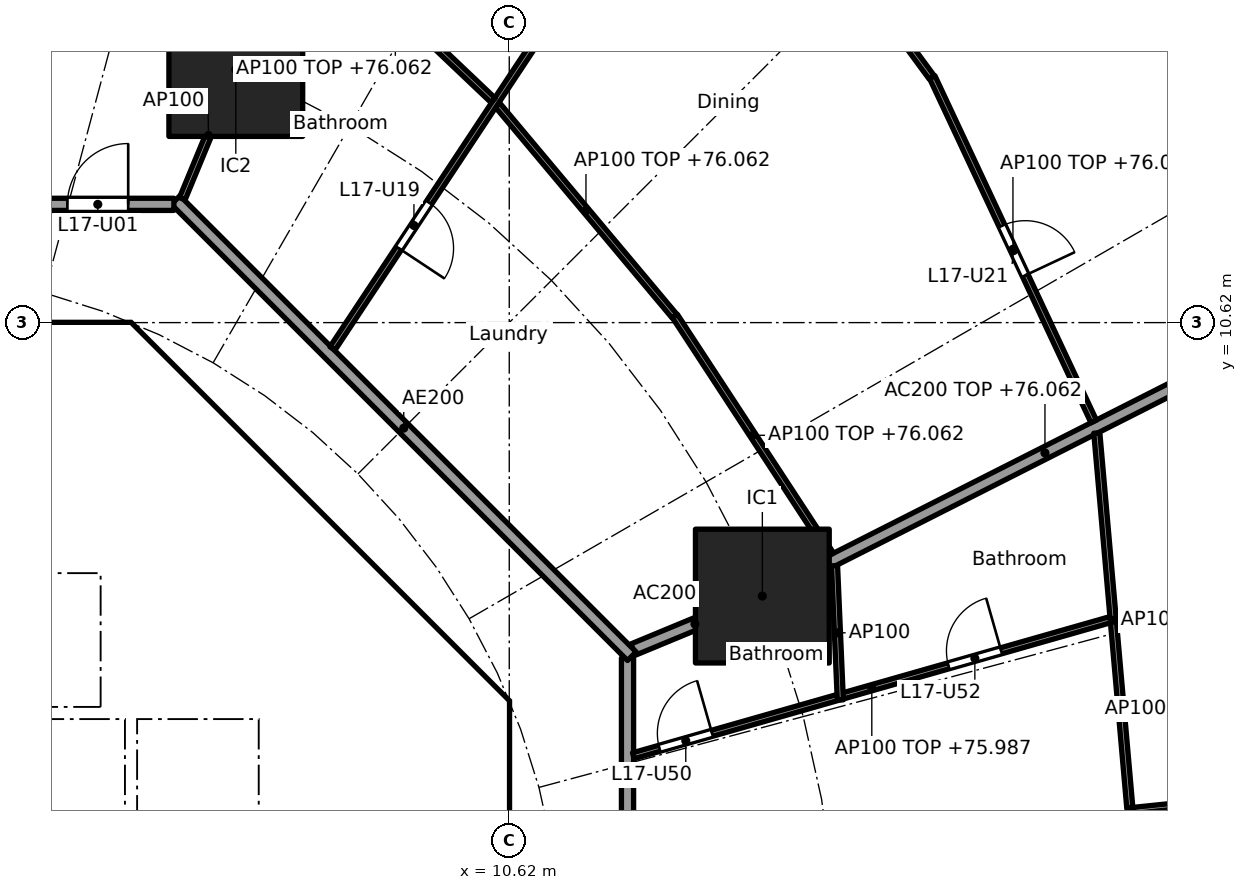
"""IFC4 building model, lengths in metres.
Left out: names, types, materials, properties, quantities, classifications, styles, units other than length and angle.
Written with IfcOpenShell. Run it as: python <this file> out.ifc"""

import sys

from ifc_helpers import new_model, si_unit, direction, frame, frame_2d, origin, origin_2d, place, context, subcontext, project, spatial, polyline, rectangle, outline, extrude, element, fill, save


model = new_model("IFC4")
c1 = context("Model", 3, precision=1e-05, world=origin(), true_north=direction((0.0, 1.0)))
c2 = subcontext(c1, "Body", "Model", "MODEL_VIEW")
j1 = project(units=[si_unit("LENGTHUNIT", "METRE"), si_unit("PLANEANGLEUNIT", "RADIAN")], contexts=[c1])
p1 = place(None, origin())
s1 = spatial("IfcSite", under=j1, at=p1, CompositionType="ELEMENT")
p2 = place(p1, origin())
s2 = spatial("IfcBuilding", under=s1, at=p2, CompositionType="ELEMENT")
p3 = place(p2, frame((0.0, 0.0, 73.3)))
s3 = spatial("IfcBuildingStorey", under=s2, at=p3, CompositionType="ELEMENT", Elevation=73.3)
for number, where, z_axis, x_axis in (
    (1, (14.782, 6.123, 0.0), (0.0, 0.0, 1.0), (1.0, 0.0, 0.0)),
    (2, (6.123, 14.782, 0.0), (0.0, 0.0, 1.0), (1.0, 0.0, 0.0)),
):
    element("IfcColumn", number, at=place(p3, frame(where, z_axis=z_axis, x_axis=x_axis)), inside=s3, PredefinedType="COLUMN", context=c2, shape_type="SweptSolid", body=[
        extrude(rectangle(XDim=2.2, YDim=2.2, at=origin_2d()), origin(), (0.0, 0.0, 1.0), 3.7),
    ])
p4 = place(p3, frame((9.988, 4.613, 0.0), z_axis=(0.0, 0.0, 1.0), x_axis=(-0.707106781187, 0.707106781187, 0.0)))
e3 = element("IfcWall", 3, at=p4, inside=s3, PredefinedType="SHEAR", context=c2, shape_type="SweptSolid", body=[
    extrude(rectangle(XDim=7.602, YDim=0.6, at=frame_2d((3.801, 0.0))), origin(), (0.0, 0.0, 1.0), 3.44),
])
p5 = place(p4, frame((3.201, 0.0, 0.0)))
e4 = element("IfcOpeningElement", 4, at=p5, cuts=e3, PredefinedType="OPENING", context=c2, shape_type="SweptSolid", body=[
    extrude(rectangle(XDim=1.2, YDim=2.1, at=frame_2d((0.6, 1.05))), frame((0.0, 0.31, 0.0), z_axis=(0.0, -1.0, 0.0), x_axis=(1.0, 0.0, 0.0)), (0.0, 0.0, 1.0), 0.62),
])
p6 = place(p3, frame((4.0, 4.3, 0.0), z_axis=(0.0, 0.0, 1.0), x_axis=(0.0, 1.0, 0.0)))
e5 = element("IfcWall", 5, at=p6, inside=s3, PredefinedType="SOLIDWALL", context=c2, shape_type="SweptSolid", body=[
    extrude(rectangle(XDim=2.2, YDim=0.2, at=frame_2d((1.1, 0.0))), origin(), (0.0, 0.0, 1.0), 3.44),
])
p7 = place(p6, frame((0.55, 0.0, 0.0)))
e6 = element("IfcOpeningElement", 6, at=p7, cuts=e5, PredefinedType="OPENING", context=c2, shape_type="SweptSolid", body=[
    extrude(rectangle(XDim=1.1, YDim=2.1, at=frame_2d((0.55, 1.05))), frame((0.0, 0.11, 0.0), z_axis=(0.0, -1.0, 0.0), x_axis=(1.0, 0.0, 0.0)), (0.0, 0.0, 1.0), 0.22),
])
p8 = place(p3, frame((6.7, 4.0, 0.0), z_axis=(0.0, 0.0, 1.0), x_axis=(1.0, 0.0, 0.0)))
e7 = element("IfcWall", 7, at=p8, inside=s3, PredefinedType="SOLIDWALL", context=c2, shape_type="SweptSolid", body=[
    extrude(rectangle(XDim=3.325, YDim=0.2, at=frame_2d((1.662, 0.0))), origin(), (0.0, 0.0, 1.0), 3.44),
])
p9 = place(p8, frame((1.25, 0.0, 0.0)))
e8 = element("IfcOpeningElement", 8, at=p9, cuts=e7, PredefinedType="OPENING", context=c2, shape_type="SweptSolid", body=[
    extrude(rectangle(XDim=1.1, YDim=2.1, at=frame_2d((0.55, 1.05))), frame((0.0, 0.11, 0.0), z_axis=(0.0, -1.0, 0.0), x_axis=(1.0, 0.0, 0.0)), (0.0, 0.0, 1.0), 0.22),
])
p10 = place(p3, frame((4.0, 7.025, 0.0), z_axis=(0.0, 0.0, 1.0), x_axis=(0.0, 1.0, 0.0)))
e9 = element("IfcWall", 9, at=p10, inside=s3, PredefinedType="SOLIDWALL", context=c2, shape_type="SweptSolid", body=[
    extrude(rectangle(XDim=3.0, YDim=0.2, at=frame_2d((1.5, 0.0))), origin(), (0.0, 0.0, 1.0), 3.44),
])
p11 = place(p10, frame((0.925, 0.0, 0.0)))
e10 = element("IfcOpeningElement", 10, at=p11, cuts=e9, PredefinedType="OPENING", context=c2, shape_type="SweptSolid", body=[
    extrude(rectangle(XDim=1.1, YDim=2.1, at=frame_2d((0.55, 1.05))), frame((0.0, 0.11, 0.0), z_axis=(0.0, -1.0, 0.0), x_axis=(1.0, 0.0, 0.0)), (0.0, 0.0, 1.0), 0.22),
])
p12 = place(p3, origin())
e11 = element("IfcWall", 11, at=p12, inside=s3, PredefinedType="SHEAR", context=c2, shape_type="SweptSolid", body=[
    extrude(outline(polyline([(-4.152, 10.025), (-4.401, 9.776), (-4.825, 10.2), (-4.401, 10.625), (4.401, 10.625), (4.825, 10.2), (4.401, 9.776), (4.152, 10.025), (-4.152, 10.025)])), origin(), (0.0, 0.0, 1.0), 3.44),
])
p13 = place(p3, origin())
e12 = element("IfcWall", 12, at=p13, inside=s3, PredefinedType="SHEAR", context=c2, shape_type="SweptSolid", body=[
    extrude(outline(polyline([(9.776, -4.401), (10.025, -4.152), (10.025, -3.801), (10.025, 4.152), (9.776, 4.401), (10.2, 4.825), (10.625, 4.401), (10.625, -4.401), (10.2, -4.825), (9.776, -4.401)])), origin(), (0.0, 0.0, 1.0), 3.44),
])
p14 = place(p3, origin())
e13 = element("IfcWall", 13, at=p14, inside=s3, PredefinedType="SOLIDWALL", context=c2, shape_type="SweptSolid", body=[
    extrude(outline(polyline([(-6.5, 2.1), (-6.7, 2.1), (-6.7, 4.3), (6.7, 4.3), (6.7, 2.1), (6.5, 2.1), (6.5, 4.1), (4.5, 4.1), (4.5, 2.1), (4.3, 2.1), (4.3, 4.1), (2.3, 4.1), (2.3, 2.1), (2.1, 2.1), (2.1, 4.1), (0.1, 4.1), (0.1, 2.1), (-0.1, 2.1), (-0.1, 4.1), (-2.1, 4.1), (-2.1, 2.1), (-2.3, 2.1), (-2.3, 4.1), (-4.3, 4.1), (-4.3, 2.1), (-4.5, 2.1), (-4.5, 4.1), (-6.5, 4.1), (-6.5, 2.1)])), origin(), (0.0, 0.0, 1.0), 3.44),
])
p15 = place(p3, origin())
e14 = element("IfcWall", 14, at=p15, inside=s3, PredefinedType="SOLIDWALL", context=c2, shape_type="SweptSolid", body=[
    extrude(outline(polyline([(4.1, 6.5), (-4.1, 6.5), (-4.1, 7.025), (4.1, 7.025), (4.1, 6.5)])), origin(), (0.0, 0.0, 1.0), 3.44),
])
p16 = place(p3, origin())
e15 = element("IfcWall", 15, at=p16, inside=s3, PredefinedType="SOLIDWALL", context=c2, shape_type="SweptSolid", body=[
    extrude(outline(polyline([(7.025, -3.9), (6.7, -3.9), (6.7, 3.9), (7.025, 3.9), (7.025, -3.9)])), origin(), (0.0, 0.0, 1.0), 3.44),
])
p17 = place(p3, frame((12.657, 5.243, 0.0), z_axis=(0.0, 0.0, 1.0), x_axis=(0.923876145736, 0.382691608661, 0.0)))
e16 = element("IfcWall", 16, at=p17, inside=s3, PredefinedType="PARTITIONING", context=c2, shape_type="SweptSolid", body=[
    extrude(rectangle(XDim=2.2, YDim=0.2, at=frame_2d((1.1, 0.0))), origin(), (0.0, 0.0, 1.0), 3.44),
])
p18 = place(p3, frame((14.827, 6.146, 0.0), z_axis=(0.0, 0.0, 1.0), x_axis=(0.892068075337, 0.451901038906, 0.0)))
e17 = element("IfcWall", 17, at=p18, inside=s3, PredefinedType="PARTITIONING", context=c2, shape_type="SweptSolid", body=[
    extrude(rectangle(XDim=10.32, YDim=0.2, at=frame_2d((5.16, 0.0))), origin(), (0.0, 0.0, 1.0), 2.762),
])
p19 = place(p3, frame((12.565, -5.104, 0.0), z_axis=(0.0, 0.0, 1.0), x_axis=(0.0, 1.0, 0.0)))
e18 = element("IfcWall", 18, at=p19, inside=s3, PredefinedType="PARTITIONING", context=c2, shape_type="SweptSolid", body=[
    extrude(rectangle(XDim=10.209, YDim=0.2, at=frame_2d((5.104, 0.0))), origin(), (0.0, 0.0, 1.0), 3.44),
])
p20 = place(p19, frame((6.339, 0.0, 0.0)))
e19 = element("IfcOpeningElement", 19, at=p20, cuts=e18, PredefinedType="OPENING", context=c2, shape_type="SweptSolid", body=[
    extrude(rectangle(XDim=1.0, YDim=2.1, at=frame_2d((0.5, 1.05))), frame((0.0, 0.11, 0.0), z_axis=(0.0, -1.0, 0.0), x_axis=(1.0, 0.0, 0.0)), (0.0, 0.0, 1.0), 0.22),
])
p21 = place(p3, frame((12.635, 5.134, 0.0), z_axis=(0.0, 0.0, 1.0), x_axis=(-0.707106781187, 0.707106781187, 0.0)))
e20 = element("IfcWall", 20, at=p21, inside=s3, PredefinedType="PARTITIONING", context=c2, shape_type="SweptSolid", body=[
    extrude(rectangle(XDim=10.609, YDim=0.2, at=frame_2d((5.305, 0.0))), origin(), (0.0, 0.0, 1.0), 3.44),
])
p22 = place(p3, frame((5.104, 12.565, 0.0), z_axis=(0.0, 0.0, 1.0), x_axis=(-1.0, 0.0, 0.0)))
e21 = element("IfcWall", 21, at=p22, inside=s3, PredefinedType="PARTITIONING", context=c2, shape_type="SweptSolid", body=[
    extrude(rectangle(XDim=10.409, YDim=0.2, at=frame_2d((5.205, 0.0))), origin(), (0.0, 0.0, 1.0), 3.44),
])
p23 = place(p22, frame((0.751, 0.0, 0.0)))
e22 = element("IfcOpeningElement", 22, at=p23, cuts=e21, PredefinedType="OPENING", context=c2, shape_type="SweptSolid", body=[
    extrude(rectangle(XDim=1.0, YDim=2.1, at=frame_2d((0.5, 1.05))), frame((0.0, 0.11, 0.0), z_axis=(0.0, -1.0, 0.0), x_axis=(1.0, 0.0, 0.0)), (0.0, 0.0, 1.0), 0.22),
])
p24 = place(p3, frame((20.879, 2.597, 0.0), z_axis=(0.0, 0.0, 1.0), x_axis=(0.994666546694, 0.103142914868, 0.0)))
e23 = element("IfcWall", 23, at=p24, inside=s3, PredefinedType="PARTITIONING", context=c2, shape_type="SweptSolid", body=[
    extrude(rectangle(XDim=3.998, YDim=0.1, at=frame_2d((1.999, 0.0))), origin(), (0.0, 0.0, 1.0), 2.762),
])
p25 = place(p24, frame((1.549, 0.0, 0.0)))
e24 = element("IfcOpeningElement", 24, at=p25, cuts=e23, PredefinedType="OPENING", context=c2, shape_type="SweptSolid", body=[
    extrude(rectangle(XDim=0.9, YDim=2.1, at=frame_2d((0.45, 1.05))), frame((0.0, 0.06, 0.0), z_axis=(0.0, -1.0, 0.0), x_axis=(1.0, 0.0, 0.0)), (0.0, 0.0, 1.0), 0.12),
])
p26 = place(p3, frame((20.825, 2.642, 0.0), z_axis=(0.0, 0.0, 1.0), x_axis=(-0.087760219522, 0.996141628419, 0.0)))
e25 = element("IfcWall", 25, at=p26, inside=s3, PredefinedType="PARTITIONING", context=c2, shape_type="SweptSolid", body=[
    extrude(rectangle(XDim=6.187, YDim=0.1, at=frame_2d((3.094, 0.0))), origin(), (0.0, 0.0, 1.0), 2.762),
])
p27 = place(p3, frame((20.834, 2.642, 0.0), z_axis=(0.0, 0.0, 1.0), x_axis=(-0.091385407685, -0.995815599025, 0.0)))
e26 = element("IfcWall", 26, at=p27, inside=s3, PredefinedType="PARTITIONING", context=c2, shape_type="SweptSolid", body=[
    extrude(rectangle(XDim=6.502, YDim=0.1, at=frame_2d((3.251, 0.0))), origin(), (0.0, 0.0, 1.0), 2.762),
])
p28 = place(p27, frame((1.201, 0.0, 0.0)))
e27 = element("IfcOpeningElement", 27, at=p28, cuts=e26, PredefinedType="OPENING", context=c2, shape_type="SweptSolid", body=[
    extrude(rectangle(XDim=0.9, YDim=2.1, at=frame_2d((0.45, 1.05))), frame((0.0, 0.06, 0.0), z_axis=(0.0, -1.0, 0.0), x_axis=(1.0, 0.0, 0.0)), (0.0, 0.0, 1.0), 0.12),
])
p29 = place(p3, frame((12.661, 3.497, 0.0), z_axis=(0.0, 0.0, 1.0), x_axis=(0.961626678623, 0.274361314621, 0.0)))
e28 = element("IfcWall", 28, at=p29, inside=s3, PredefinedType="PARTITIONING", context=c2, shape_type="SweptSolid", body=[
    extrude(rectangle(XDim=8.156, YDim=0.1, at=frame_2d((4.078, 0.0))), origin(), (0.0, 0.0, 1.0), 2.687),
])
p30 = place(p29, frame((0.446, 0.0, 0.0)))
e29 = element("IfcOpeningElement", 29, at=p30, cuts=e28, PredefinedType="OPENING", context=c2, shape_type="SweptSolid", body=[
    extrude(rectangle(XDim=0.9, YDim=2.1, at=frame_2d((0.45, 1.05))), frame((0.0, 0.06, 0.0), z_axis=(0.0, -1.0, 0.0), x_axis=(1.0, 0.0, 0.0)), (0.0, 0.0, 1.0), 0.12),
])
p31 = place(p29, frame((5.39, 0.0, 0.0)))
e30 = element("IfcOpeningElement", 30, at=p31, cuts=e28, PredefinedType="OPENING", context=c2, shape_type="SweptSolid", body=[
    extrude(rectangle(XDim=0.9, YDim=2.1, at=frame_2d((0.45, 1.05))), frame((0.0, 0.06, 0.0), z_axis=(0.0, -1.0, 0.0), x_axis=(1.0, 0.0, 0.0)), (0.0, 0.0, 1.0), 0.12),
])
p32 = place(p3, frame((16.064, 4.415, 0.0), z_axis=(0.0, 0.0, 1.0), x_axis=(-0.043101501373, 0.999070698489, 0.0)))
e31 = element("IfcWall", 31, at=p32, inside=s3, PredefinedType="PARTITIONING", context=c2, shape_type="SweptSolid", body=[
    extrude(rectangle(XDim=2.209, YDim=0.1, at=frame_2d((1.104, 0.0))), origin(), (0.0, 0.0, 1.0), 3.44),
])
p33 = place(p3, frame((15.91, 6.806, 0.0), z_axis=(0.0, 0.0, 1.0), x_axis=(-0.547468243486, 0.836826458936, 0.0)))
e32 = element("IfcWall", 32, at=p33, inside=s3, PredefinedType="PARTITIONING", context=c2, shape_type="SweptSolid", body=[
    extrude(rectangle(XDim=4.688, YDim=0.1, at=frame_2d((2.344, 0.0))), origin(), (0.0, 0.0, 1.0), 2.762),
])
p34 = place(p3, frame((20.231, 8.995, 0.0), z_axis=(0.0, 0.0, 1.0), x_axis=(-0.424587886407, 0.905386727712, 0.0)))
e33 = element("IfcWall", 33, at=p34, inside=s3, PredefinedType="PARTITIONING", context=c2, shape_type="SweptSolid", body=[
    extrude(rectangle(XDim=6.254, YDim=0.1, at=frame_2d((3.127, 0.0))), origin(), (0.0, 0.0, 1.0), 2.762),
])
p35 = place(p34, frame((2.652, 0.0, 0.0)))
e34 = element("IfcOpeningElement", 34, at=p35, cuts=e33, PredefinedType="OPENING", context=c2, shape_type="SweptSolid", body=[
    extrude(rectangle(XDim=0.9, YDim=2.1, at=frame_2d((0.45, 1.05))), frame((0.0, 0.06, 0.0), z_axis=(0.0, -1.0, 0.0), x_axis=(1.0, 0.0, 0.0)), (0.0, 0.0, 1.0), 0.12),
])
p36 = place(p3, frame((13.339, 10.725, 0.0), z_axis=(0.0, 0.0, 1.0), x_axis=(-0.642515455924, 0.766272724882, 0.0)))
e35 = element("IfcWall", 35, at=p36, inside=s3, PredefinedType="PARTITIONING", context=c2, shape_type="SweptSolid", body=[
    extrude(rectangle(XDim=4.537, YDim=0.1, at=frame_2d((2.269, 0.0))), origin(), (0.0, 0.0, 1.0), 2.762),
])
p37 = place(p3, frame((17.567, 14.653, 0.0), z_axis=(0.0, 0.0, 1.0), x_axis=(-0.592391983588, 0.80564988536, 0.0)))
e36 = element("IfcWall", 36, at=p37, inside=s3, PredefinedType="PARTITIONING", context=c2, shape_type="SweptSolid", body=[
    extrude(rectangle(XDim=6.08, YDim=0.1, at=frame_2d((3.04, 0.0))), origin(), (0.0, 0.0, 1.0), 2.762),
])
p38 = place(p3, frame((7.713, 10.195, 0.0), z_axis=(0.0, 0.0, 1.0), x_axis=(0.552111071171, 0.833770571015, 0.0)))
e37 = element("IfcWall", 37, at=p38, inside=s3, PredefinedType="PARTITIONING", context=c2, shape_type="SweptSolid", body=[
    extrude(rectangle(XDim=17.208, YDim=0.1, at=frame_2d((8.604, 0.0))), origin(), (0.0, 0.0, 1.0), 2.687),
])
p39 = place(p38, frame((1.976, 0.0, 0.0)))
e38 = element("IfcOpeningElement", 38, at=p39, cuts=e37, PredefinedType="OPENING", context=c2, shape_type="SweptSolid", body=[
    extrude(rectangle(XDim=0.9, YDim=2.1, at=frame_2d((0.45, 1.05))), frame((0.0, 0.06, 0.0), z_axis=(0.0, -1.0, 0.0), x_axis=(1.0, 0.0, 0.0)), (0.0, 0.0, 1.0), 0.12),
])
p40 = place(p38, frame((7.611, 0.0, 0.0)))
e39 = element("IfcOpeningElement", 39, at=p40, cuts=e37, PredefinedType="OPENING", context=c2, shape_type="SweptSolid", body=[
    extrude(rectangle(XDim=0.9, YDim=2.1, at=frame_2d((0.45, 1.05))), frame((0.0, 0.06, 0.0), z_axis=(0.0, -1.0, 0.0), x_axis=(1.0, 0.0, 0.0)), (0.0, 0.0, 1.0), 0.12),
])
p41 = place(p3, frame((10.355, 14.274, 0.0), z_axis=(0.0, 0.0, 1.0), x_axis=(-0.725219204328, 0.688518050361, 0.0)))
e40 = element("IfcWall", 40, at=p41, inside=s3, PredefinedType="PARTITIONING", context=c2, shape_type="SweptSolid", body=[
    extrude(rectangle(XDim=4.437, YDim=0.1, at=frame_2d((2.219, 0.0))), origin(), (0.0, 0.0, 1.0), 2.762),
])
p42 = place(p3, frame((5.243, 12.657, 0.0), z_axis=(0.0, 0.0, 1.0), x_axis=(0.382719158442, 0.923864733477, 0.0)))
e41 = element("IfcWall", 41, at=p42, inside=s3, PredefinedType="PARTITIONING", context=c2, shape_type="SweptSolid", body=[
    extrude(rectangle(XDim=2.25, YDim=0.1, at=frame_2d((1.125, 0.0))), origin(), (0.0, 0.0, 1.0), 3.44),
])
p43 = place(p3, frame((6.141, 14.829, 0.0), z_axis=(0.0, 0.0, 1.0), x_axis=(0.354477134193, 0.935064682968, 0.0)))
e42 = element("IfcWall", 42, at=p43, inside=s3, PredefinedType="PARTITIONING", context=c2, shape_type="SweptSolid", body=[
    extrude(rectangle(XDim=15.626, YDim=0.1, at=frame_2d((7.813, 0.0))), origin(), (0.0, 0.0, 1.0), 2.762),
])
p44 = place(p43, frame((1.35, 0.0, 0.0)))
e43 = element("IfcOpeningElement", 43, at=p44, cuts=e42, PredefinedType="OPENING", context=c2, shape_type="SweptSolid", body=[
    extrude(rectangle(XDim=0.9, YDim=2.1, at=frame_2d((0.45, 1.05))), frame((0.0, 0.06, 0.0), z_axis=(0.0, -1.0, 0.0), x_axis=(1.0, 0.0, 0.0)), (0.0, 0.0, 1.0), 0.12),
])
p45 = place(p43, frame((5.606, 0.0, 0.0)))
e44 = element("IfcOpeningElement", 44, at=p45, cuts=e42, PredefinedType="OPENING", context=c2, shape_type="SweptSolid", body=[
    extrude(rectangle(XDim=0.9, YDim=2.1, at=frame_2d((0.45, 1.05))), frame((0.0, 0.06, 0.0), z_axis=(0.0, -1.0, 0.0), x_axis=(1.0, 0.0, 0.0)), (0.0, 0.0, 1.0), 0.12),
])
p46 = place(p3, frame((2.615, 12.664, 0.0), z_axis=(0.0, 0.0, 1.0), x_axis=(0.130614967904, 0.99143316979, 0.0)))
e45 = element("IfcWall", 45, at=p46, inside=s3, PredefinedType="PARTITIONING", context=c2, shape_type="SweptSolid", body=[
    extrude(rectangle(XDim=20.034, YDim=0.1, at=frame_2d((10.017, 0.0))), origin(), (0.0, 0.0, 1.0), 2.687),
])
p47 = place(p46, frame((2.359, 0.0, 0.0)))
e46 = element("IfcOpeningElement", 46, at=p47, cuts=e45, PredefinedType="OPENING", context=c2, shape_type="SweptSolid", body=[
    extrude(rectangle(XDim=0.9, YDim=2.1, at=frame_2d((0.45, 1.05))), frame((0.0, 0.06, 0.0), z_axis=(0.0, -1.0, 0.0), x_axis=(1.0, 0.0, 0.0)), (0.0, 0.0, 1.0), 0.12),
])
p48 = place(p46, frame((8.873, 0.0, 0.0)))
e47 = element("IfcOpeningElement", 47, at=p48, cuts=e45, PredefinedType="OPENING", context=c2, shape_type="SweptSolid", body=[
    extrude(rectangle(XDim=0.9, YDim=2.1, at=frame_2d((0.45, 1.05))), frame((0.0, 0.06, 0.0), z_axis=(0.0, -1.0, 0.0), x_axis=(1.0, 0.0, 0.0)), (0.0, 0.0, 1.0), 0.12),
])
p49 = place(p7, origin())
e48 = element("IfcDoor", 48, at=p49, inside=s3, OperationType="DOUBLE_DOOR_SLIDING", PredefinedType="DOOR", context=c2, shape_type="SweptSolid", body=[
    extrude(rectangle(XDim=1.1, YDim=2.1, at=frame_2d((0.55, 1.05))), frame((0.0, 0.025, 0.0), z_axis=(0.0, -1.0, 0.0), x_axis=(1.0, 0.0, 0.0)), (0.0, 0.0, 1.0), 0.05),
])
fill(e6, e48)
p50 = place(p9, frame((1.1, 0.0, 0.0), x_axis=(-1.0, 0.0, 0.0)))
e49 = element("IfcDoor", 49, at=p50, inside=s3, OperationType="SINGLE_SWING_RIGHT", PredefinedType="DOOR", context=c2, shape_type="SweptSolid", body=[
    extrude(rectangle(XDim=1.1, YDim=2.1, at=frame_2d((0.55, 1.05))), frame((0.0, 0.025, 0.0), z_axis=(0.0, -1.0, 0.0), x_axis=(1.0, 0.0, 0.0)), (0.0, 0.0, 1.0), 0.05),
])
fill(e8, e49)
p51 = place(p11, origin())
e50 = element("IfcDoor", 50, at=p51, inside=s3, OperationType="SINGLE_SWING_LEFT", PredefinedType="DOOR", context=c2, shape_type="SweptSolid", body=[
    extrude(rectangle(XDim=1.1, YDim=2.1, at=frame_2d((0.55, 1.05))), frame((0.0, 0.025, 0.0), z_axis=(0.0, -1.0, 0.0), x_axis=(1.0, 0.0, 0.0)), (0.0, 0.0, 1.0), 0.05),
])
fill(e10, e50)
p52 = place(p5, origin())
e51 = element("IfcDoor", 51, at=p52, inside=s3, OperationType="SINGLE_SWING_LEFT", PredefinedType="DOOR", context=c2, shape_type="SweptSolid", body=[
    extrude(rectangle(XDim=1.2, YDim=2.1, at=frame_2d((0.6, 1.05))), frame((0.0, 0.025, 0.0), z_axis=(0.0, -1.0, 0.0), x_axis=(1.0, 0.0, 0.0)), (0.0, 0.0, 1.0), 0.05),
])
fill(e4, e51)
p53 = place(p23, frame((1.0, 0.0, 0.0), x_axis=(-1.0, 0.0, 0.0)))
e52 = element("IfcDoor", 52, at=p53, inside=s3, OperationType="SINGLE_SWING_RIGHT", PredefinedType="DOOR", context=c2, shape_type="SweptSolid", body=[
    extrude(rectangle(XDim=1.0, YDim=2.1, at=frame_2d((0.5, 1.05))), frame((0.0, 0.025, 0.0), z_axis=(0.0, -1.0, 0.0), x_axis=(1.0, 0.0, 0.0)), (0.0, 0.0, 1.0), 0.05),
])
fill(e22, e52)
p54 = place(p39, frame((0.9, 0.0, 0.0), x_axis=(-1.0, 0.0, 0.0)))
e53 = element("IfcDoor", 53, at=p54, inside=s3, OperationType="SINGLE_SWING_RIGHT", PredefinedType="DOOR", context=c2, shape_type="SweptSolid", body=[
    extrude(rectangle(XDim=0.9, YDim=2.1, at=frame_2d((0.45, 1.05))), frame((0.0, 0.025, 0.0), z_axis=(0.0, -1.0, 0.0), x_axis=(1.0, 0.0, 0.0)), (0.0, 0.0, 1.0), 0.05),
])
fill(e38, e53)
p55 = place(p35, frame((0.9, 0.0, 0.0), x_axis=(-1.0, 0.0, 0.0)))
e54 = element("IfcDoor", 54, at=p55, inside=s3, OperationType="SINGLE_SWING_RIGHT", PredefinedType="DOOR", context=c2, shape_type="SweptSolid", body=[
    extrude(rectangle(XDim=0.9, YDim=2.1, at=frame_2d((0.45, 1.05))), frame((0.0, 0.025, 0.0), z_axis=(0.0, -1.0, 0.0), x_axis=(1.0, 0.0, 0.0)), (0.0, 0.0, 1.0), 0.05),
])
fill(e34, e54)
p56 = place(p30, origin())
e55 = element("IfcDoor", 55, at=p56, inside=s3, OperationType="SINGLE_SWING_RIGHT", PredefinedType="DOOR", context=c2, shape_type="SweptSolid", body=[
    extrude(rectangle(XDim=0.9, YDim=2.1, at=frame_2d((0.45, 1.05))), frame((0.0, 0.025, 0.0), z_axis=(0.0, -1.0, 0.0), x_axis=(1.0, 0.0, 0.0)), (0.0, 0.0, 1.0), 0.05),
])
fill(e29, e55)
p57 = place(p31, origin())
e56 = element("IfcDoor", 56, at=p57, inside=s3, OperationType="SINGLE_SWING_RIGHT", PredefinedType="DOOR", context=c2, shape_type="SweptSolid", body=[
    extrude(rectangle(XDim=0.9, YDim=2.1, at=frame_2d((0.45, 1.05))), frame((0.0, 0.025, 0.0), z_axis=(0.0, -1.0, 0.0), x_axis=(1.0, 0.0, 0.0)), (0.0, 0.0, 1.0), 0.05),
])
fill(e30, e56)
save(model, sys.argv[1])
